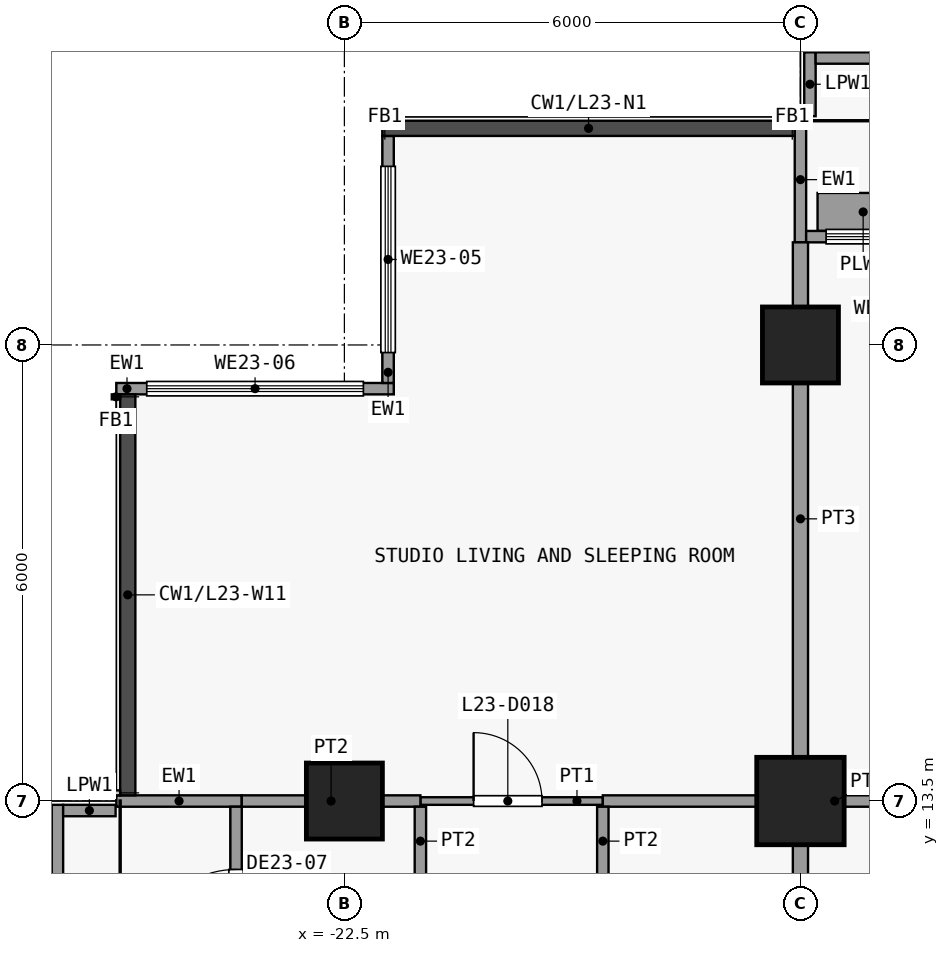
"""IFC4 building model, lengths in metres.
Left out: names, types, materials, properties, quantities, classifications, styles, units other than length and angle.
Written with IfcOpenShell. Run it as: python <this file> out.ifc"""

import sys

from ifc_helpers import new_model, si_unit, direction, frame, frame_2d, origin, origin_2d, place, context, subcontext, project, spatial, rectangle, extrude, element, fill, save


model = new_model("IFC4")
c1 = context("Model", 3, precision=1e-05, world=origin(), true_north=direction((0.0, 1.0)))
c2 = subcontext(c1, "Body", "Model", "MODEL_VIEW")
j1 = project(units=[si_unit("LENGTHUNIT", "METRE"), si_unit("PLANEANGLEUNIT", "RADIAN")], contexts=[c1])
p1 = place(None, origin())
s1 = spatial("IfcSite", under=j1, at=p1, CompositionType="ELEMENT")
p2 = place(p1, origin())
s2 = spatial("IfcBuilding", under=s1, at=p2, CompositionType="ELEMENT")
p3 = place(p2, frame((0.0, 0.0, 95.5)))
s3 = spatial("IfcBuildingStorey", under=s2, at=p3, CompositionType="ELEMENT", Elevation=95.5)
p4 = place(p3, frame((-22.5, 13.5, 0.0), z_axis=(0.0, 0.0, 1.0), x_axis=(1.0, 0.0, 0.0)))
e1 = element("IfcColumn", 1, at=p4, inside=s3, PredefinedType="COLUMN", context=c2, shape_type="SweptSolid", body=[
    extrude(rectangle(XDim=1.0, YDim=1.0, at=origin_2d()), origin(), (0.0, 0.0, 1.0), 3.6),
])
p5 = place(p3, frame((-16.5, 13.5, 0.0), z_axis=(0.0, 0.0, 1.0), x_axis=(1.0, 0.0, 0.0)))
e2 = element("IfcColumn", 2, at=p5, inside=s3, PredefinedType="COLUMN", context=c2, shape_type="SweptSolid", body=[
    extrude(rectangle(XDim=1.15, YDim=1.15, at=origin_2d()), origin(), (0.0, 0.0, 1.0), 3.6),
])
p6 = place(p3, frame((-16.5, 19.5, 0.0), z_axis=(0.0, 0.0, 1.0), x_axis=(1.0, 0.0, 0.0)))
e3 = element("IfcColumn", 3, at=p6, inside=s3, PredefinedType="COLUMN", context=c2, shape_type="SweptSolid", body=[
    extrude(rectangle(XDim=1.0, YDim=1.0, at=origin_2d()), origin(), (0.0, 0.0, 1.0), 3.6),
])
p7 = place(p3, frame((-21.925, 19.0, 0.0), z_axis=(0.0, 0.0, 1.0), x_axis=(0.0, 1.0, 0.0)))
e4 = element("IfcWall", 4, at=p7, inside=s3, PredefinedType="SOLIDWALL", context=c2, shape_type="SweptSolid", body=[
    extrude(rectangle(XDim=3.25, YDim=0.15, at=frame_2d((1.625, 0.0))), origin(), (0.0, 0.0, 1.0), 3.3),
])
p8 = place(p7, frame((0.4, 0.0, 0.9)))
e5 = element("IfcOpeningElement", 5, at=p8, cuts=e4, PredefinedType="OPENING", context=c2, shape_type="SweptSolid", body=[
    extrude(rectangle(XDim=2.45, YDim=2.4, at=frame_2d((1.225, 1.2))), frame((0.0, 0.085, 0.0), z_axis=(0.0, -1.0, 0.0), x_axis=(1.0, 0.0, 0.0)), (0.0, 0.0, 1.0), 0.17),
])
p9 = place(p3, frame((-25.5, 18.925, 0.0), z_axis=(0.0, 0.0, 1.0), x_axis=(1.0, 0.0, 0.0)))
e6 = element("IfcWall", 6, at=p9, inside=s3, PredefinedType="SOLIDWALL", context=c2, shape_type="SweptSolid", body=[
    extrude(rectangle(XDim=3.65, YDim=0.15, at=frame_2d((1.825, 0.0))), origin(), (0.0, 0.0, 1.0), 3.3),
])
p10 = place(p9, frame((0.4, 0.0, 0.9)))
e7 = element("IfcOpeningElement", 7, at=p10, cuts=e6, PredefinedType="OPENING", context=c2, shape_type="SweptSolid", body=[
    extrude(rectangle(XDim=2.85, YDim=2.4, at=frame_2d((1.425, 1.2))), frame((0.0, 0.085, 0.0), z_axis=(0.0, -1.0, 0.0), x_axis=(1.0, 0.0, 0.0)), (0.0, 0.0, 1.0), 0.17),
])
p11 = place(p3, frame((-16.5, 20.85, 0.0), z_axis=(0.0, 0.0, 1.0), x_axis=(0.0, 1.0, 0.0)))
e8 = element("IfcWall", 8, at=p11, inside=s3, PredefinedType="SOLIDWALL", context=c2, shape_type="SweptSolid", body=[
    extrude(rectangle(XDim=1.65, YDim=0.15, at=frame_2d((0.825, 0.0))), origin(), (0.0, 0.0, 1.0), 3.3),
])
p12 = place(p3, frame((-16.425, 20.925, 0.0), z_axis=(0.0, 0.0, 1.0), x_axis=(1.0, 0.0, 0.0)))
e9 = element("IfcWall", 9, at=p12, inside=s3, PredefinedType="SOLIDWALL", context=c2, shape_type="SweptSolid", body=[
    extrude(rectangle(XDim=5.925, YDim=0.15, at=frame_2d((2.962, 0.0))), origin(), (0.0, 0.0, 1.0), 3.3),
])
p13 = place(p12, frame((2.325, 0.0, 0.0)))
e10 = element("IfcOpeningElement", 10, at=p13, cuts=e9, PredefinedType="OPENING", context=c2, shape_type="SweptSolid", body=[
    extrude(rectangle(XDim=1.2, YDim=2.4, at=frame_2d((0.6, 1.2))), frame((0.0, 0.085, 0.0), z_axis=(0.0, -1.0, 0.0), x_axis=(1.0, 0.0, 0.0)), (0.0, 0.0, 1.0), 0.17),
])
p14 = place(p12, frame((0.262, 0.0, 0.9)))
e11 = element("IfcOpeningElement", 11, at=p14, cuts=e9, PredefinedType="OPENING", context=c2, shape_type="SweptSolid", body=[
    extrude(rectangle(XDim=1.8, YDim=2.1, at=frame_2d((0.9, 1.05))), frame((0.0, 0.085, 0.0), z_axis=(0.0, -1.0, 0.0), x_axis=(1.0, 0.0, 0.0)), (0.0, 0.0, 1.0), 0.17),
])
p15 = place(p12, frame((3.825, 0.0, 0.9)))
e12 = element("IfcOpeningElement", 12, at=p15, cuts=e9, PredefinedType="OPENING", context=c2, shape_type="SweptSolid", body=[
    extrude(rectangle(XDim=1.8, YDim=2.1, at=frame_2d((0.9, 1.05))), frame((0.0, 0.085, 0.0), z_axis=(0.0, -1.0, 0.0), x_axis=(1.0, 0.0, 0.0)), (0.0, 0.0, 1.0), 0.17),
])
p16 = place(p3, frame((-16.275, 21.25, 0.0), z_axis=(0.0, 0.0, 1.0), x_axis=(1.0, 0.0, 0.0)))
e13 = element("IfcWall", 13, at=p16, inside=s3, PredefinedType="USERDEFINED", context=c2, shape_type="SweptSolid", body=[
    extrude(rectangle(XDim=1.2, YDim=0.5, at=frame_2d((0.6, 0.0))), origin(), (0.0, 0.0, 1.0), 0.9),
])
p17 = place(p3, frame((-23.85, 13.5, 0.0), z_axis=(0.0, 0.0, 1.0), x_axis=(-1.0, 0.0, 0.0)))
e14 = element("IfcWall", 14, at=p17, inside=s3, PredefinedType="SOLIDWALL", context=c2, shape_type="SweptSolid", body=[
    extrude(rectangle(XDim=1.65, YDim=0.15, at=frame_2d((0.825, 0.0))), origin(), (0.0, 0.0, 1.0), 3.3),
])
p18 = place(p3, frame((-23.925, 7.575, 0.0), z_axis=(0.0, 0.0, 1.0), x_axis=(0.0, 1.0, 0.0)))
e15 = element("IfcWall", 15, at=p18, inside=s3, PredefinedType="SOLIDWALL", context=c2, shape_type="SweptSolid", body=[
    extrude(rectangle(XDim=5.85, YDim=0.15, at=frame_2d((2.925, 0.0))), origin(), (0.0, 0.0, 1.0), 3.3),
])
p19 = place(p18, frame((3.825, 0.0, 0.0)))
e16 = element("IfcOpeningElement", 16, at=p19, cuts=e15, PredefinedType="OPENING", context=c2, shape_type="SweptSolid", body=[
    extrude(rectangle(XDim=1.2, YDim=2.4, at=frame_2d((0.6, 1.2))), frame((0.0, 0.085, 0.0), z_axis=(0.0, -1.0, 0.0), x_axis=(1.0, 0.0, 0.0)), (0.0, 0.0, 1.0), 0.17),
])
p20 = place(p18, frame((1.012, 0.0, 0.9)))
e17 = element("IfcOpeningElement", 17, at=p20, cuts=e15, PredefinedType="OPENING", context=c2, shape_type="SweptSolid", body=[
    extrude(rectangle(XDim=1.8, YDim=2.1, at=frame_2d((0.9, 1.05))), frame((0.0, 0.085, 0.0), z_axis=(0.0, -1.0, 0.0), x_axis=(1.0, 0.0, 0.0)), (0.0, 0.0, 1.0), 0.17),
])
p21 = place(p3, frame((-26.275, 7.51, 0.0), z_axis=(0.0, 0.0, 1.0), x_axis=(0.0, 1.0, 0.0)))
e18 = element("IfcWall", 18, at=p21, inside=s3, PredefinedType="PARAPET", context=c2, shape_type="SweptSolid", body=[
    extrude(rectangle(XDim=5.94, YDim=0.15, at=frame_2d((2.97, 0.0))), origin(), (0.0, 0.0, 1.0), 1.15),
])
p22 = place(p3, frame((-26.2, 13.375, 0.0), z_axis=(0.0, 0.0, 1.0), x_axis=(1.0, 0.0, 0.0)))
e19 = element("IfcWall", 19, at=p22, inside=s3, PredefinedType="PARAPET", context=c2, shape_type="SweptSolid", body=[
    extrude(rectangle(XDim=0.69, YDim=0.15, at=frame_2d((0.345, 0.0))), origin(), (0.0, 0.0, 1.0), 1.15),
])
p23 = place(p3, frame((-16.375, 22.51, 0.0), z_axis=(0.0, 0.0, 1.0), x_axis=(0.0, 1.0, 0.0)))
e20 = element("IfcWall", 20, at=p23, inside=s3, PredefinedType="PARAPET", context=c2, shape_type="SweptSolid", body=[
    extrude(rectangle(XDim=0.84, YDim=0.15, at=frame_2d((0.42, 0.0))), origin(), (0.0, 0.0, 1.0), 1.15),
])
p24 = place(p3, frame((-16.3, 23.275, 0.0), z_axis=(0.0, 0.0, 1.0), x_axis=(1.0, 0.0, 0.0)))
e21 = element("IfcWall", 21, at=p24, inside=s3, PredefinedType="PARAPET", context=c2, shape_type="SweptSolid", body=[
    extrude(rectangle(XDim=5.75, YDim=0.15, at=frame_2d((2.875, 0.0))), origin(), (0.0, 0.0, 1.0), 1.15),
])
p25 = place(p3, frame((-21.5, 13.5, 0.0), z_axis=(0.0, 0.0, 1.0), x_axis=(1.0, 0.0, 0.0)))
e22 = element("IfcWall", 22, at=p25, inside=s3, PredefinedType="PARTITIONING", context=c2, shape_type="SweptSolid", body=[
    extrude(rectangle(XDim=2.4, YDim=0.1, at=frame_2d((1.2, 0.0))), origin(), (0.0, 0.0, 1.0), 3.3),
])
p26 = place(p25, frame((0.7, 0.0, 0.0)))
e23 = element("IfcOpeningElement", 23, at=p26, cuts=e22, PredefinedType="OPENING", context=c2, shape_type="SweptSolid", body=[
    extrude(rectangle(XDim=0.9, YDim=2.1, at=frame_2d((0.45, 1.05))), frame((0.0, 0.06, 0.0), z_axis=(0.0, -1.0, 0.0), x_axis=(1.0, 0.0, 0.0)), (0.0, 0.0, 1.0), 0.12),
])
p27 = place(p3, frame((-23.85, 13.5, 0.0), z_axis=(0.0, 0.0, 1.0), x_axis=(1.0, 0.0, 0.0)))
e24 = element("IfcWall", 24, at=p27, inside=s3, PredefinedType="PARTITIONING", context=c2, shape_type="SweptSolid", body=[
    extrude(rectangle(XDim=2.35, YDim=0.15, at=frame_2d((1.175, 0.0))), origin(), (0.0, 0.0, 1.0), 3.3),
])
p28 = place(p3, frame((-19.1, 13.5, 0.0), z_axis=(0.0, 0.0, 1.0), x_axis=(1.0, 0.0, 0.0)))
e25 = element("IfcWall", 25, at=p28, inside=s3, PredefinedType="PARTITIONING", context=c2, shape_type="SweptSolid", body=[
    extrude(rectangle(XDim=6.1, YDim=0.15, at=frame_2d((3.05, 0.0))), origin(), (0.0, 0.0, 1.0), 3.3),
])
p29 = place(p3, frame((-21.5, 10.6, 0.0), z_axis=(0.0, 0.0, 1.0), x_axis=(0.0, 1.0, 0.0)))
e26 = element("IfcWall", 26, at=p29, inside=s3, PredefinedType="PARTITIONING", context=c2, shape_type="SweptSolid", body=[
    extrude(rectangle(XDim=2.825, YDim=0.15, at=frame_2d((1.413, 0.0))), origin(), (0.0, 0.0, 1.0), 3.3),
])
p30 = place(p29, frame((0.9, 0.0, 0.0)))
e27 = element("IfcOpeningElement", 27, at=p30, cuts=e26, PredefinedType="OPENING", context=c2, shape_type="SweptSolid", body=[
    extrude(rectangle(XDim=0.9, YDim=2.1, at=frame_2d((0.45, 1.05))), frame((0.0, 0.085, 0.0), z_axis=(0.0, -1.0, 0.0), x_axis=(1.0, 0.0, 0.0)), (0.0, 0.0, 1.0), 0.17),
])
p31 = place(p3, frame((-19.1, 10.6, 0.0), z_axis=(0.0, 0.0, 1.0), x_axis=(0.0, 1.0, 0.0)))
e28 = element("IfcWall", 28, at=p31, inside=s3, PredefinedType="PARTITIONING", context=c2, shape_type="SweptSolid", body=[
    extrude(rectangle(XDim=2.825, YDim=0.15, at=frame_2d((1.413, 0.0))), origin(), (0.0, 0.0, 1.0), 3.3),
])
p32 = place(p31, frame((0.9, 0.0, 0.0)))
e29 = element("IfcOpeningElement", 29, at=p32, cuts=e28, PredefinedType="OPENING", context=c2, shape_type="SweptSolid", body=[
    extrude(rectangle(XDim=0.9, YDim=2.1, at=frame_2d((0.45, 1.05))), frame((0.0, 0.085, 0.0), z_axis=(0.0, -1.0, 0.0), x_axis=(1.0, 0.0, 0.0)), (0.0, 0.0, 1.0), 0.17),
])
p33 = place(p3, frame((-16.5, 10.6, 0.0), z_axis=(0.0, 0.0, 1.0), x_axis=(0.0, 1.0, 0.0)))
e30 = element("IfcWall", 30, at=p33, inside=s3, PredefinedType="PARTITIONING", context=c2, shape_type="SweptSolid", body=[
    extrude(rectangle(XDim=2.825, YDim=0.2, at=frame_2d((1.413, 0.0))), origin(), (0.0, 0.0, 1.0), 3.3),
])
p34 = place(p3, frame((-16.5, 13.575, 0.0), z_axis=(0.0, 0.0, 1.0), x_axis=(0.0, 1.0, 0.0)))
e31 = element("IfcWall", 31, at=p34, inside=s3, PredefinedType="PARTITIONING", context=c2, shape_type="SweptSolid", body=[
    extrude(rectangle(XDim=7.275, YDim=0.2, at=frame_2d((3.638, 0.0))), origin(), (0.0, 0.0, 1.0), 3.3),
])
p35 = place(p8, origin())
e32 = element("IfcWindow", 32, at=p35, inside=s3, PartitioningType="SINGLE_PANEL", PredefinedType="WINDOW", context=c2, shape_type="SweptSolid", body=[
    extrude(rectangle(XDim=2.45, YDim=2.4, at=frame_2d((1.225, 1.2))), frame((0.0, 0.03, 0.0), z_axis=(0.0, -1.0, 0.0), x_axis=(1.0, 0.0, 0.0)), (0.0, 0.0, 1.0), 0.06),
])
fill(e5, e32)
p36 = place(p10, origin())
e33 = element("IfcWindow", 33, at=p36, inside=s3, PartitioningType="SINGLE_PANEL", PredefinedType="WINDOW", context=c2, shape_type="SweptSolid", body=[
    extrude(rectangle(XDim=2.85, YDim=2.4, at=frame_2d((1.425, 1.2))), frame((0.0, 0.03, 0.0), z_axis=(0.0, -1.0, 0.0), x_axis=(1.0, 0.0, 0.0)), (0.0, 0.0, 1.0), 0.06),
])
fill(e7, e33)
p37 = place(p14, origin())
e34 = element("IfcWindow", 34, at=p37, inside=s3, PartitioningType="SINGLE_PANEL", PredefinedType="WINDOW", context=c2, shape_type="SweptSolid", body=[
    extrude(rectangle(XDim=1.8, YDim=2.1, at=frame_2d((0.9, 1.05))), frame((0.0, 0.03, 0.0), z_axis=(0.0, -1.0, 0.0), x_axis=(1.0, 0.0, 0.0)), (0.0, 0.0, 1.0), 0.06),
])
fill(e11, e34)
p38 = place(p19, origin())
e35 = element("IfcDoor", 35, at=p38, inside=s3, OperationType="SINGLE_SWING_LEFT", PredefinedType="DOOR", context=c2, shape_type="SweptSolid", body=[
    extrude(rectangle(XDim=1.2, YDim=2.4, at=frame_2d((0.6, 1.2))), frame((0.0, 0.025, 0.0), z_axis=(0.0, -1.0, 0.0), x_axis=(1.0, 0.0, 0.0)), (0.0, 0.0, 1.0), 0.05),
])
fill(e16, e35)
p39 = place(p26, origin())
e36 = element("IfcDoor", 36, at=p39, inside=s3, OperationType="SINGLE_SWING_RIGHT", PredefinedType="DOOR", context=c2, shape_type="SweptSolid", body=[
    extrude(rectangle(XDim=0.9, YDim=2.1, at=frame_2d((0.45, 1.05))), frame((0.0, 0.025, 0.0), z_axis=(0.0, -1.0, 0.0), x_axis=(1.0, 0.0, 0.0)), (0.0, 0.0, 1.0), 0.05),
])
fill(e23, e36)
save(model, sys.argv[1])
